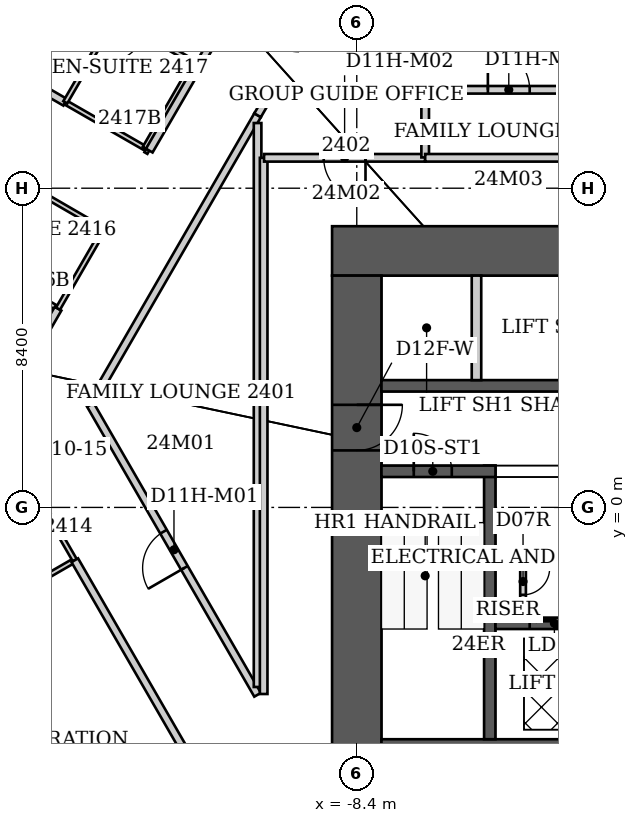
"""IFC4 building model, lengths in metres.
Left out: names, types, materials, properties, quantities, classifications, styles, units other than length and angle.
Written with IfcOpenShell. Run it as: python <this file> out.ifc"""

import sys

from ifc_helpers import new_model, si_unit, direction, frame, frame_2d, origin, place, context, subcontext, project, spatial, rectangle, extrude, element, fill, save


model = new_model("IFC4")
c1 = context("Model", 3, precision=1e-05, world=origin(), true_north=direction((0.0, 1.0)))
c2 = subcontext(c1, "Body", "Model", "MODEL_VIEW")
j1 = project(units=[si_unit("LENGTHUNIT", "METRE"), si_unit("PLANEANGLEUNIT", "RADIAN")], contexts=[c1])
p1 = place(None, origin())
s1 = spatial("IfcSite", under=j1, at=p1, CompositionType="ELEMENT")
p2 = place(p1, origin())
s2 = spatial("IfcBuilding", under=s1, at=p2, CompositionType="ELEMENT")
p3 = place(p2, frame((0.0, 0.0, 100.6)))
s3 = spatial("IfcBuildingStorey", under=s2, at=p3, CompositionType="ELEMENT", Elevation=100.6)
p4 = place(p3, frame((-9.05, 6.75, 0.0), z_axis=(0.0, 0.0, 1.0), x_axis=(1.0, 0.0, 0.0)))
e1 = element("IfcWall", 1, at=p4, inside=s3, PredefinedType="SHEAR", context=c2, shape_type="SweptSolid", body=[
    extrude(rectangle(XDim=18.1, YDim=1.3, at=frame_2d((9.05, 0.0))), origin(), (0.0, 0.0, 1.0), 3.8),
])
p5 = place(p3, frame((-8.4, -9.2, 0.0), z_axis=(0.0, 0.0, 1.0), x_axis=(0.0, 1.0, 0.0)))
e2 = element("IfcWall", 2, at=p5, inside=s3, PredefinedType="SHEAR", context=c2, shape_type="SweptSolid", body=[
    extrude(rectangle(XDim=15.3, YDim=1.3, at=frame_2d((7.65, 0.0))), origin(), (0.0, 0.0, 1.0), 3.8),
])
p6 = place(p5, frame((10.7, 0.0, 0.0)))
e3 = element("IfcOpeningElement", 3, at=p6, cuts=e2, PredefinedType="OPENING", context=c2, shape_type="SweptSolid", body=[
    extrude(rectangle(XDim=1.2, YDim=2.2, at=frame_2d((0.6, 1.1))), frame((0.0, 0.65, 0.0), z_axis=(0.0, -1.0, 0.0), x_axis=(1.0, 0.0, 0.0)), (0.0, 0.0, 1.0), 1.3),
])
p7 = place(p3, frame((-7.75, -6.5, 0.0), z_axis=(0.0, 0.0, 1.0), x_axis=(1.0, 0.0, 0.0)))
e4 = element("IfcWall", 4, at=p7, inside=s3, PredefinedType="SHEAR", context=c2, shape_type="SweptSolid", body=[
    extrude(rectangle(XDim=15.5, YDim=0.8, at=frame_2d((7.75, 0.0))), origin(), (0.0, 0.0, 1.0), 3.8),
])
p8 = place(p3, frame((-4.9, -6.1, 0.0), z_axis=(0.0, 0.0, 1.0), x_axis=(0.0, 1.0, 0.0)))
e5 = element("IfcWall", 5, at=p8, inside=s3, PredefinedType="SHEAR", context=c2, shape_type="SweptSolid", body=[
    extrude(rectangle(XDim=7.2, YDim=0.3, at=frame_2d((3.6, 0.0))), origin(), (0.0, 0.0, 1.0), 3.8),
])
p9 = place(p3, frame((-7.75, 0.95, 0.0), z_axis=(0.0, 0.0, 1.0), x_axis=(1.0, 0.0, 0.0)))
e6 = element("IfcWall", 6, at=p9, inside=s3, PredefinedType="SHEAR", context=c2, shape_type="SweptSolid", body=[
    extrude(rectangle(XDim=3.0, YDim=0.3, at=frame_2d((1.5, 0.0))), origin(), (0.0, 0.0, 1.0), 3.8),
])
p10 = place(p9, frame((0.85, 0.0, 0.0)))
e7 = element("IfcOpeningElement", 7, at=p10, cuts=e6, PredefinedType="OPENING", context=c2, shape_type="SweptSolid", body=[
    extrude(rectangle(XDim=1.0, YDim=2.2, at=frame_2d((0.5, 1.1))), frame((0.0, 0.15, 0.0), z_axis=(0.0, -1.0, 0.0), x_axis=(1.0, 0.0, 0.0)), (0.0, 0.0, 1.0), 0.3),
])
p11 = place(p3, frame((-4.75, -3.05, 0.0), z_axis=(0.0, 0.0, 1.0), x_axis=(1.0, 0.0, 0.0)))
e8 = element("IfcWall", 8, at=p11, inside=s3, PredefinedType="SHEAR", context=c2, shape_type="SweptSolid", body=[
    extrude(rectangle(XDim=3.1, YDim=0.3, at=frame_2d((1.55, 0.0))), origin(), (0.0, 0.0, 1.0), 3.8),
])
p12 = place(p11, frame((0.9, 0.0, 0.0)))
e9 = element("IfcOpeningElement", 9, at=p12, cuts=e8, PredefinedType="OPENING", context=c2, shape_type="SweptSolid", body=[
    extrude(rectangle(XDim=1.3, YDim=2.1, at=frame_2d((0.65, 1.05))), frame((0.0, 0.15, 0.0), z_axis=(0.0, -1.0, 0.0), x_axis=(1.0, 0.0, 0.0)), (0.0, 0.0, 1.0), 0.3),
])
p13 = place(p3, frame((-7.75, 3.2, 0.0), z_axis=(0.0, 0.0, 1.0), x_axis=(1.0, 0.0, 0.0)))
e10 = element("IfcWall", 10, at=p13, inside=s3, PredefinedType="SHEAR", context=c2, shape_type="SweptSolid", body=[
    extrude(rectangle(XDim=15.5, YDim=0.3, at=frame_2d((7.75, 0.0))), origin(), (0.0, 0.0, 1.0), 3.8),
])
p14 = place(p13, frame((7.2, 0.0, 0.0)))
e11 = element("IfcOpeningElement", 11, at=p14, cuts=e10, PredefinedType="OPENING", context=c2, shape_type="SweptSolid", body=[
    extrude(rectangle(XDim=1.1, YDim=2.2, at=frame_2d((0.55, 1.1))), frame((0.0, 0.15, 0.0), z_axis=(0.0, -1.0, 0.0), x_axis=(1.0, 0.0, 0.0)), (0.0, 0.0, 1.0), 0.3),
])
p15 = place(p13, frame((12.45, 0.0, 0.0)))
e12 = element("IfcOpeningElement", 12, at=p15, cuts=e10, PredefinedType="OPENING", context=c2, shape_type="SweptSolid", body=[
    extrude(rectangle(XDim=1.1, YDim=2.2, at=frame_2d((0.55, 1.1))), frame((0.0, 0.15, 0.0), z_axis=(0.0, -1.0, 0.0), x_axis=(1.0, 0.0, 0.0)), (0.0, 0.0, 1.0), 0.3),
])
p16 = place(p3, frame((-5.25, 3.35, 0.0), z_axis=(0.0, 0.0, 1.0), x_axis=(0.0, 1.0, 0.0)))
e13 = element("IfcWall", 13, at=p16, inside=s3, PredefinedType="PARTITIONING", context=c2, shape_type="SweptSolid", body=[
    extrude(rectangle(XDim=2.75, YDim=0.25, at=frame_2d((1.375, 0.0))), origin(), (0.0, 0.0, 1.0), 3.8),
])
p17 = place(p3, frame((-23.794, 15.125, 0.0), z_axis=(0.0, 0.0, 1.0), x_axis=(0.865748355596, -0.500479554809, 0.0)))
e14 = element("IfcWall", 14, at=p17, inside=s3, PredefinedType="PARTITIONING", context=c2, shape_type="SweptSolid", body=[
    extrude(rectangle(XDim=8.922, YDim=0.2, at=frame_2d((4.461, 0.0))), origin(), (0.0, 0.0, 1.0), 3.64),
])
p18 = place(p17, frame((3.961, 0.0, 0.0)))
e15 = element("IfcOpeningElement", 15, at=p18, cuts=e14, PredefinedType="OPENING", context=c2, shape_type="SweptSolid", body=[
    extrude(rectangle(XDim=1.0, YDim=2.13, at=frame_2d((0.5, 1.065))), frame((0.0, 0.1, 0.0), z_axis=(0.0, -1.0, 0.0), x_axis=(1.0, 0.0, 0.0)), (0.0, 0.0, 1.0), 0.2),
])
p19 = place(p3, frame((-18.52, 6.54, 0.0), z_axis=(0.0, 0.0, 1.0), x_axis=(0.865155281359, -0.50150407689, 0.0)))
e16 = element("IfcWall", 16, at=p19, inside=s3, PredefinedType="PARTITIONING", context=c2, shape_type="SweptSolid", body=[
    extrude(rectangle(XDim=2.612, YDim=0.12, at=frame_2d((1.306, 0.0))), origin(), (0.0, 0.0, 1.0), 3.64),
])
p20 = place(p19, frame((1.412, 0.0, 0.0)))
e17 = element("IfcOpeningElement", 17, at=p20, cuts=e16, PredefinedType="OPENING", context=c2, shape_type="SweptSolid", body=[
    extrude(rectangle(XDim=0.9, YDim=2.03, at=frame_2d((0.45, 1.015))), frame((0.0, 0.06, 0.0), z_axis=(0.0, -1.0, 0.0), x_axis=(1.0, 0.0, 0.0)), (0.0, 0.0, 1.0), 0.12),
])
p21 = place(p3, frame((-17.78, -2.52, 0.0), z_axis=(0.0, 0.0, 1.0), x_axis=(0.866304131286, 0.49951691875, 0.0)))
e18 = element("IfcWall", 18, at=p21, inside=s3, PredefinedType="PARTITIONING", context=c2, shape_type="SweptSolid", body=[
    extrude(rectangle(XDim=2.262, YDim=0.12, at=frame_2d((1.131, 0.0))), origin(), (0.0, 0.0, 1.0), 3.64),
])
p22 = place(p3, frame((-17.35, 3.34, 0.0), z_axis=(0.0, 0.0, 1.0), x_axis=(0.499641723021, 0.866232156305, 0.0)))
e19 = element("IfcWall", 19, at=p22, inside=s3, PredefinedType="PARTITIONING", context=c2, shape_type="SweptSolid", body=[
    extrude(rectangle(XDim=2.182, YDim=0.2, at=frame_2d((1.091, 0.0))), origin(), (0.0, 0.0, 1.0), 3.64),
])
p23 = place(p3, frame((-17.32, 8.62, 0.0), z_axis=(0.0, 0.0, 1.0), x_axis=(0.865155281359, -0.50150407689, 0.0)))
e20 = element("IfcWall", 20, at=p23, inside=s3, PredefinedType="PARTITIONING", context=c2, shape_type="SweptSolid", body=[
    extrude(rectangle(XDim=2.612, YDim=0.12, at=frame_2d((1.306, 0.0))), origin(), (0.0, 0.0, 1.0), 3.64),
])
p24 = place(p3, frame((-17.05, 0.74, 0.0), z_axis=(0.0, 0.0, 1.0), x_axis=(0.500163488538, -0.865930993055, 0.0)))
e21 = element("IfcWall", 21, at=p24, inside=s3, PredefinedType="PARTITIONING", context=c2, shape_type="SweptSolid", body=[
    extrude(rectangle(XDim=2.46, YDim=0.12, at=frame_2d((1.23, 0.0))), origin(), (0.0, 0.0, 1.0), 3.64),
])
p25 = place(p3, frame((-16.261, 5.231, 0.0), z_axis=(0.0, 0.0, 1.0), x_axis=(0.500326720225, 0.865836689583, 0.0)))
e22 = element("IfcWall", 22, at=p25, inside=s3, PredefinedType="PARTITIONING", context=c2, shape_type="SweptSolid", body=[
    extrude(rectangle(XDim=2.401, YDim=0.12, at=frame_2d((1.201, 0.0))), origin(), (0.0, 0.0, 1.0), 3.64),
])
p26 = place(p3, frame((-16.07, 10.66, 0.0), z_axis=(0.0, 0.0, 1.0), x_axis=(0.866987280299, -0.498330267795, 0.0)))
e23 = element("IfcWall", 23, at=p26, inside=s3, PredefinedType="PARTITIONING", context=c2, shape_type="SweptSolid", body=[
    extrude(rectangle(XDim=2.41, YDim=0.12, at=frame_2d((1.205, 0.0))), origin(), (0.0, 0.0, 1.0), 3.64),
])
p27 = place(p3, frame((-15.82, -1.39, 0.0), z_axis=(0.0, 0.0, 1.0), x_axis=(0.499851259758, -0.866111261974, 0.0)))
e24 = element("IfcWall", 24, at=p27, inside=s3, PredefinedType="PARTITIONING", context=c2, shape_type="SweptSolid", body=[
    extrude(rectangle(XDim=7.548, YDim=0.2, at=frame_2d((3.774, 0.0))), origin(), (0.0, 0.0, 1.0), 3.64),
])
p28 = place(p3, frame((-15.41, 2.7, 0.0), z_axis=(0.0, 0.0, 1.0), x_axis=(0.500036278648, 0.866004457284, 0.0)))
e25 = element("IfcWall", 25, at=p28, inside=s3, PredefinedType="PARTITIONING", context=c2, shape_type="SweptSolid", body=[
    extrude(rectangle(XDim=8.799, YDim=0.2, at=frame_2d((4.399, 0.0))), origin(), (0.0, 0.0, 1.0), 3.64),
])
p29 = place(p3, frame((-14.76, 12.91, 0.0), z_axis=(0.0, 0.0, 1.0), x_axis=(-0.503171227198, -0.864186736834, 0.0)))
e26 = element("IfcWall", 26, at=p29, inside=s3, PredefinedType="PARTITIONING", context=c2, shape_type="SweptSolid", body=[
    extrude(rectangle(XDim=2.604, YDim=0.12, at=frame_2d((1.302, 0.0))), origin(), (0.0, 0.0, 1.0), 3.64),
])
p30 = place(p29, frame((0.3, 0.0, 0.0)))
e27 = element("IfcOpeningElement", 27, at=p30, cuts=e26, PredefinedType="OPENING", context=c2, shape_type="SweptSolid", body=[
    extrude(rectangle(XDim=0.9, YDim=2.03, at=frame_2d((0.45, 1.015))), frame((0.0, 0.06, 0.0), z_axis=(0.0, -1.0, 0.0), x_axis=(1.0, 0.0, 0.0)), (0.0, 0.0, 1.0), 0.12),
])
p31 = place(p3, frame((-13.98, 9.46, 0.0), z_axis=(0.0, 0.0, 1.0), x_axis=(0.500291685314, 0.865856933682, 0.0)))
e28 = element("IfcWall", 28, at=p31, inside=s3, PredefinedType="PARTITIONING", context=c2, shape_type="SweptSolid", body=[
    extrude(rectangle(XDim=2.599, YDim=0.12, at=frame_2d((1.299, 0.0))), origin(), (0.0, 0.0, 1.0), 3.64),
])
p32 = place(p3, frame((-13.937, 9.434, 0.0), z_axis=(0.0, 0.0, 1.0), x_axis=(0.867735735179, -0.497025848315, 0.0)))
e29 = element("IfcWall", 29, at=p32, inside=s3, PredefinedType="PARTITIONING", context=c2, shape_type="SweptSolid", body=[
    extrude(rectangle(XDim=0.089, YDim=0.2, at=frame_2d((0.044, 0.0))), origin(), (0.0, 0.0, 1.0), 3.64),
])
p33 = place(p3, frame((-12.68, 11.71, 0.0), z_axis=(0.0, 0.0, 1.0), x_axis=(-0.866202511239, 0.499693115345, 0.0)))
e30 = element("IfcWall", 30, at=p33, inside=s3, PredefinedType="PARTITIONING", context=c2, shape_type="SweptSolid", body=[
    extrude(rectangle(XDim=2.401, YDim=0.12, at=frame_2d((1.201, 0.0))), origin(), (0.0, 0.0, 1.0), 3.64),
])
p34 = place(p3, frame((-11.77, 12.99, 0.0), z_axis=(0.0, 0.0, 1.0), x_axis=(-0.502083167097, -0.864819341434, 0.0)))
e31 = element("IfcWall", 31, at=p34, inside=s3, PredefinedType="PARTITIONING", context=c2, shape_type="SweptSolid", body=[
    extrude(rectangle(XDim=4.163, YDim=0.2, at=frame_2d((2.082, 0.0))), origin(), (0.0, 0.0, 1.0), 3.64),
])
p35 = place(p3, frame((-11.01, -4.93, 0.0), z_axis=(0.0, 0.0, 1.0), x_axis=(-0.499556067326, 0.866281556769, 0.0)))
e32 = element("IfcWall", 32, at=p35, inside=s3, PredefinedType="PARTITIONING", context=c2, shape_type="SweptSolid", body=[
    extrude(rectangle(XDim=8.808, YDim=0.2, at=frame_2d((4.404, 0.0))), origin(), (0.0, 0.0, 1.0), 3.64),
])
p36 = place(p35, frame((3.854, 0.0, 0.0)))
e33 = element("IfcOpeningElement", 33, at=p36, cuts=e32, PredefinedType="OPENING", context=c2, shape_type="SweptSolid", body=[
    extrude(rectangle(XDim=1.1, YDim=2.2, at=frame_2d((0.55, 1.1))), frame((0.0, 0.1, 0.0), z_axis=(0.0, -1.0, 0.0), x_axis=(1.0, 0.0, 0.0)), (0.0, 0.0, 1.0), 0.2),
])
p37 = place(p3, frame((-11.01, 10.115, 0.0), z_axis=(0.0, 0.0, 1.0), x_axis=(0.0, -1.0, 0.0)))
e34 = element("IfcWall", 34, at=p37, inside=s3, PredefinedType="PARTITIONING", context=c2, shape_type="SweptSolid", body=[
    extrude(rectangle(XDim=14.84, YDim=0.2, at=frame_2d((7.42, 0.0))), origin(), (0.0, 0.0, 1.0), 3.64),
])
p38 = place(p3, frame((-11.01, 10.32, 0.0), z_axis=(0.0, 0.0, 1.0), x_axis=(0.503009091795, 0.864281119527, 0.0)))
e35 = element("IfcWall", 35, at=p38, inside=s3, PredefinedType="PARTITIONING", context=c2, shape_type="SweptSolid", body=[
    extrude(rectangle(XDim=0.775, YDim=0.2, at=frame_2d((0.388, 0.0))), origin(), (0.0, 0.0, 1.0), 3.64),
])
p39 = place(p3, frame((-10.85, 9.2, 0.0), z_axis=(0.0, 0.0, 1.0), x_axis=(0.0, -1.0, 0.0)))
e36 = element("IfcWall", 36, at=p39, inside=s3, PredefinedType="PARTITIONING", context=c2, shape_type="SweptSolid", body=[
    extrude(rectangle(XDim=14.11, YDim=0.2, at=frame_2d((7.055, 0.0))), origin(), (0.0, 0.0, 1.0), 3.64),
])
p40 = place(p3, frame((-10.62, 10.99, 0.0), z_axis=(0.0, 0.0, 1.0), x_axis=(1.0, 0.0, 0.0)))
e37 = element("IfcWall", 37, at=p40, inside=s3, PredefinedType="PARTITIONING", context=c2, shape_type="SweptSolid", body=[
    extrude(rectangle(XDim=4.02, YDim=0.2, at=frame_2d((2.01, 0.0))), origin(), (0.0, 0.0, 1.0), 3.64),
])
p41 = place(p3, frame((-6.6, 9.2, 0.0), z_axis=(0.0, 0.0, 1.0), x_axis=(-1.0, 0.0, 0.0)))
e38 = element("IfcWall", 38, at=p41, inside=s3, PredefinedType="PARTITIONING", context=c2, shape_type="SweptSolid", body=[
    extrude(rectangle(XDim=4.24, YDim=0.2, at=frame_2d((2.12, 0.0))), origin(), (0.0, 0.0, 1.0), 3.64),
])
p42 = place(p41, frame((1.57, 0.0, 0.0)))
e39 = element("IfcOpeningElement", 39, at=p42, cuts=e38, PredefinedType="OPENING", context=c2, shape_type="SweptSolid", body=[
    extrude(rectangle(XDim=1.1, YDim=2.2, at=frame_2d((0.55, 1.1))), frame((0.0, 0.1, 0.0), z_axis=(0.0, -1.0, 0.0), x_axis=(1.0, 0.0, 0.0)), (0.0, 0.0, 1.0), 0.2),
])
p43 = place(p3, frame((-6.6, 10.98, 0.0), z_axis=(0.0, 0.0, 1.0), x_axis=(0.0, -1.0, 0.0)))
e40 = element("IfcWall", 40, at=p43, inside=s3, PredefinedType="PARTITIONING", context=c2, shape_type="SweptSolid", body=[
    extrude(rectangle(XDim=1.77, YDim=0.2, at=frame_2d((0.885, 0.0))), origin(), (0.0, 0.0, 1.0), 3.64),
])
p44 = place(p3, frame((-6.6, 10.99, 0.0), z_axis=(0.0, 0.0, 1.0), x_axis=(1.0, 0.0, 0.0)))
e41 = element("IfcWall", 41, at=p44, inside=s3, PredefinedType="PARTITIONING", context=c2, shape_type="SweptSolid", body=[
    extrude(rectangle(XDim=4.4, YDim=0.2, at=frame_2d((2.2, 0.0))), origin(), (0.0, 0.0, 1.0), 3.64),
])
p45 = place(p44, frame((1.65, 0.0, 0.0)))
e42 = element("IfcOpeningElement", 42, at=p45, cuts=e41, PredefinedType="OPENING", context=c2, shape_type="SweptSolid", body=[
    extrude(rectangle(XDim=1.1, YDim=2.2, at=frame_2d((0.55, 1.1))), frame((0.0, 0.1, 0.0), z_axis=(0.0, -1.0, 0.0), x_axis=(1.0, 0.0, 0.0)), (0.0, 0.0, 1.0), 0.2),
])
p46 = place(p3, frame((-2.2, 9.2, 0.0), z_axis=(0.0, 0.0, 1.0), x_axis=(-1.0, 0.0, 0.0)))
e43 = element("IfcWall", 43, at=p46, inside=s3, PredefinedType="PARTITIONING", context=c2, shape_type="SweptSolid", body=[
    extrude(rectangle(XDim=4.4, YDim=0.2, at=frame_2d((2.2, 0.0))), origin(), (0.0, 0.0, 1.0), 3.64),
])
p47 = place(p3, frame((-4.025, -2.9, 0.0), z_axis=(0.0, 0.0, 1.0), x_axis=(0.0, 1.0, 0.0)))
e44 = element("IfcWall", 44, at=p47, inside=s3, PredefinedType="PARTITIONING", context=c2, shape_type="SweptSolid", body=[
    extrude(rectangle(XDim=1.775, YDim=0.15, at=frame_2d((0.887, 0.0))), origin(), (0.0, 0.0, 1.0), 3.64),
])
p48 = place(p47, frame((0.6, 0.0, 0.0)))
e45 = element("IfcOpeningElement", 45, at=p48, cuts=e44, PredefinedType="OPENING", context=c2, shape_type="SweptSolid", body=[
    extrude(rectangle(XDim=0.7, YDim=2.1, at=frame_2d((0.35, 1.05))), frame((0.0, 0.075, 0.0), z_axis=(0.0, -1.0, 0.0), x_axis=(1.0, 0.0, 0.0)), (0.0, 0.0, 1.0), 0.15),
])
p49 = place(p3, frame((-4.75, -1.2, 0.0), z_axis=(0.0, 0.0, 1.0), x_axis=(1.0, 0.0, 0.0)))
e46 = element("IfcWall", 46, at=p49, inside=s3, PredefinedType="PARTITIONING", context=c2, shape_type="SweptSolid", body=[
    extrude(rectangle(XDim=0.8, YDim=0.15, at=frame_2d((0.4, 0.0))), origin(), (0.0, 0.0, 1.0), 3.64),
])
p50 = place(p30, origin())
e47 = element("IfcDoor", 47, at=p50, inside=s3, OperationType="SINGLE_SWING_LEFT", PredefinedType="DOOR", context=c2, shape_type="SweptSolid", body=[
    extrude(rectangle(XDim=0.9, YDim=2.03, at=frame_2d((0.45, 1.015))), frame((0.0, 0.025, 0.0), z_axis=(0.0, -1.0, 0.0), x_axis=(1.0, 0.0, 0.0)), (0.0, 0.0, 1.0), 0.05),
])
fill(e27, e47)
p51 = place(p36, origin())
e48 = element("IfcDoor", 48, at=p51, inside=s3, OperationType="SINGLE_SWING_LEFT", PredefinedType="DOOR", context=c2, shape_type="SweptSolid", body=[
    extrude(rectangle(XDim=1.1, YDim=2.2, at=frame_2d((0.55, 1.1))), frame((0.0, 0.025, 0.0), z_axis=(0.0, -1.0, 0.0), x_axis=(1.0, 0.0, 0.0)), (0.0, 0.0, 1.0), 0.05),
])
fill(e33, e48)
p52 = place(p42, origin())
e49 = element("IfcDoor", 49, at=p52, inside=s3, OperationType="SINGLE_SWING_LEFT", PredefinedType="DOOR", context=c2, shape_type="SweptSolid", body=[
    extrude(rectangle(XDim=1.1, YDim=2.2, at=frame_2d((0.55, 1.1))), frame((0.0, 0.025, 0.0), z_axis=(0.0, -1.0, 0.0), x_axis=(1.0, 0.0, 0.0)), (0.0, 0.0, 1.0), 0.05),
])
fill(e39, e49)
p53 = place(p45, origin())
e50 = element("IfcDoor", 50, at=p53, inside=s3, OperationType="SINGLE_SWING_LEFT", PredefinedType="DOOR", context=c2, shape_type="SweptSolid", body=[
    extrude(rectangle(XDim=1.1, YDim=2.2, at=frame_2d((0.55, 1.1))), frame((0.0, 0.025, 0.0), z_axis=(0.0, -1.0, 0.0), x_axis=(1.0, 0.0, 0.0)), (0.0, 0.0, 1.0), 0.05),
])
fill(e42, e50)
p54 = place(p10, origin())
e51 = element("IfcDoor", 51, at=p54, inside=s3, OperationType="SINGLE_SWING_LEFT", PredefinedType="DOOR", context=c2, shape_type="SweptSolid", body=[
    extrude(rectangle(XDim=1.0, YDim=2.2, at=frame_2d((0.5, 1.1))), frame((0.0, 0.025, 0.0), z_axis=(0.0, -1.0, 0.0), x_axis=(1.0, 0.0, 0.0)), (0.0, 0.0, 1.0), 0.05),
])
fill(e7, e51)
p55 = place(p6, origin())
e52 = element("IfcDoor", 52, at=p55, inside=s3, OperationType="SINGLE_SWING_RIGHT", PredefinedType="DOOR", context=c2, shape_type="SweptSolid", body=[
    extrude(rectangle(XDim=1.2, YDim=2.2, at=frame_2d((0.6, 1.1))), frame((0.0, 0.025, 0.0), z_axis=(0.0, -1.0, 0.0), x_axis=(1.0, 0.0, 0.0)), (0.0, 0.0, 1.0), 0.05),
])
fill(e3, e52)
p56 = place(p48, origin())
e53 = element("IfcDoor", 53, at=p56, inside=s3, OperationType="SINGLE_SWING_RIGHT", PredefinedType="DOOR", context=c2, shape_type="SweptSolid", body=[
    extrude(rectangle(XDim=0.7, YDim=2.1, at=frame_2d((0.35, 1.05))), frame((0.0, 0.025, 0.0), z_axis=(0.0, -1.0, 0.0), x_axis=(1.0, 0.0, 0.0)), (0.0, 0.0, 1.0), 0.05),
])
fill(e45, e53)
p57 = place(p12, origin())
e54 = element("IfcDoor", 54, at=p57, inside=s3, OperationType="DOUBLE_DOOR_SLIDING", PredefinedType="DOOR", context=c2, shape_type="SweptSolid", body=[
    extrude(rectangle(XDim=1.3, YDim=2.1, at=frame_2d((0.65, 1.05))), frame((0.0, 0.025, 0.0), z_axis=(0.0, -1.0, 0.0), x_axis=(1.0, 0.0, 0.0)), (0.0, 0.0, 1.0), 0.05),
])
fill(e9, e54)
save(model, sys.argv[1])
